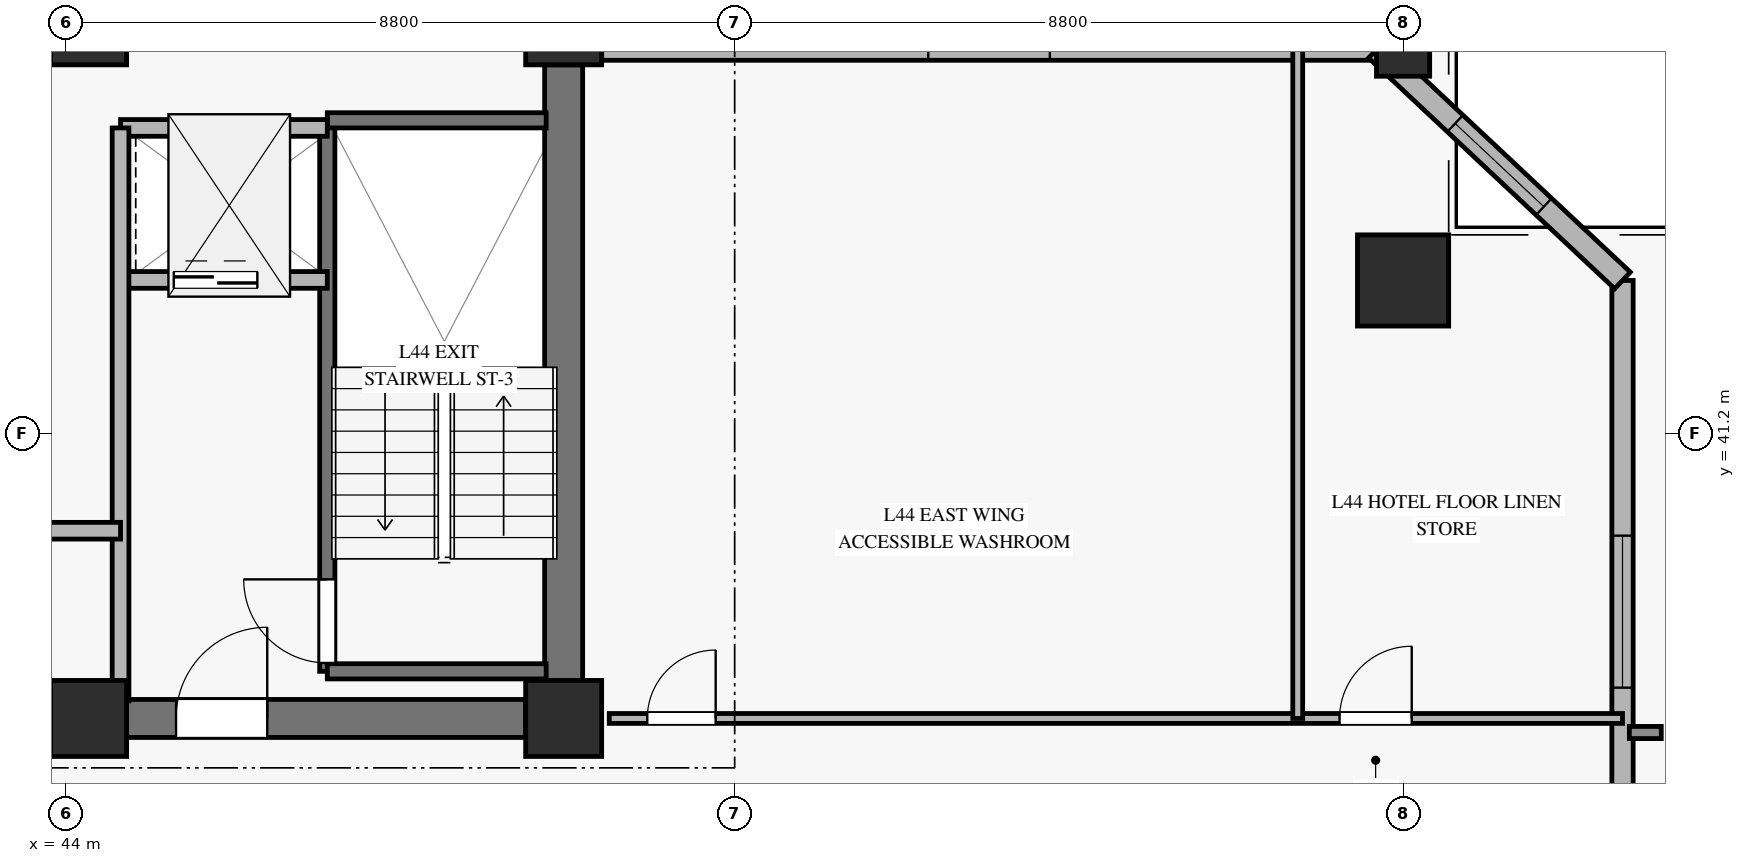
"""IFC4 building model, lengths in metres.
Left out: names, types, materials, properties, quantities, classifications, styles, units other than length and angle.
Written with IfcOpenShell. Run it as: python <this file> out.ifc"""

import sys

from ifc_helpers import new_model, si_unit, direction, frame, frame_2d, origin, origin_2d, place, context, subcontext, project, spatial, rectangle, hollow_rectangle, extrude, source, transform, mapped, element, fill, save


model = new_model("IFC4")
c1 = context("Model", 3, precision=1e-05, world=origin(), true_north=direction((0.0, 1.0)))
c2 = subcontext(c1, "Body", "Model", "MODEL_VIEW")
j1 = project(units=[si_unit("LENGTHUNIT", "METRE"), si_unit("PLANEANGLEUNIT", "RADIAN")], contexts=[c1])
p1 = place(None, origin())
s1 = spatial("IfcSite", under=j1, at=p1, CompositionType="ELEMENT")
p2 = place(p1, origin())
s2 = spatial("IfcBuilding", under=s1, at=p2, CompositionType="ELEMENT")
p3 = place(p2, frame((0.0, 0.0, 177.2)))
s3 = spatial("IfcBuildingStorey", under=s2, at=p3, CompositionType="ELEMENT", Elevation=177.2)
m1 = source(origin(), c2, "Body", "SweptSolid", [
    extrude(rectangle(XDim=1.0, YDim=1.0, at=origin_2d()), origin(), (0.0, 0.0, 1.0), 3.27),
])
for number, where, z_axis, x_axis in (
    (1, (44.3, 37.45, 0.0), (0.0, 0.0, 1.0), (1.0, 0.0, 0.0)),
    (2, (44.3, 46.55, 0.0), (0.0, 0.0, 1.0), (1.0, 0.0, 0.0)),
    (3, (50.55, 37.45, 0.0), (0.0, 0.0, 1.0), (1.0, 0.0, 0.0)),
    (4, (50.55, 46.55, 0.0), (0.0, 0.0, 1.0), (1.0, 0.0, 0.0)),
):
    element("IfcColumn", number, at=place(p3, frame(where, z_axis=z_axis, x_axis=x_axis)), inside=s3, PredefinedType="PILASTER", context=c2, shape_type="MappedRepresentation", body=[
        mapped(m1, transform((0.0, 0.0, 0.0), x_axis=(1.0, 0.0, 0.0), y_axis=(0.0, 1.0, 0.0), z_axis=(0.0, 0.0, 1.0), scale=1.0)),
    ])
p4 = place(p3, frame((44.8, 37.45, 0.0), z_axis=(0.0, 0.0, 1.0), x_axis=(1.0, 0.0, 0.0)))
e5 = element("IfcWall", 5, at=p4, inside=s3, PredefinedType="SHEAR", context=c2, shape_type="SweptSolid", body=[
    extrude(rectangle(XDim=5.25, YDim=0.5, at=frame_2d((2.625, 0.0))), origin(), (0.0, 0.0, 1.0), 3.27),
])
p5 = place(p4, frame((0.65, 0.0, 0.0)))
e6 = element("IfcOpeningElement", 6, at=p5, cuts=e5, PredefinedType="OPENING", context=c2, shape_type="SweptSolid", body=[
    extrude(rectangle(XDim=1.2, YDim=2.15, at=frame_2d((0.6, 1.075))), frame((0.0, 0.26, 0.0), z_axis=(0.0, -1.0, 0.0), x_axis=(1.0, 0.0, 0.0)), (0.0, 0.0, 1.0), 0.52),
])
p6 = place(p3, frame((50.55, 37.95, 0.0), z_axis=(0.0, 0.0, 1.0), x_axis=(0.0, 1.0, 0.0)))
e7 = element("IfcWall", 7, at=p6, inside=s3, PredefinedType="SHEAR", context=c2, shape_type="SweptSolid", body=[
    extrude(rectangle(XDim=8.1, YDim=0.5, at=frame_2d((4.05, 0.0))), origin(), (0.0, 0.0, 1.0), 3.27),
])
m2 = source(origin(), c2, "Body", "SweptSolid", [
    extrude(hollow_rectangle(XDim=1.2, YDim=1.2, WallThickness=0.055, at=origin_2d()), origin(), (0.0, 0.0, 1.0), 3.277),
])
p7 = place(p3, frame((61.594, 43.213, 0.0), z_axis=(-0.06348024984, 0.007972284898, 0.997951251592), x_axis=(-0.124608036267, -0.992206045788, 0.0)))
e8 = element("IfcColumn", 8, at=p7, inside=s3, PredefinedType="COLUMN", context=c2, shape_type="MappedRepresentation", body=[
    mapped(m2, transform((0.0, 0.0, 0.0), x_axis=(1.0, 0.0, 0.0), y_axis=(0.0, 1.0, 0.0), z_axis=(0.0, 0.0, 1.0), scale=1.0)),
])
m3 = source(origin(), c2, "Body", "SweptSolid", [
    extrude(hollow_rectangle(XDim=0.7, YDim=0.7, WallThickness=0.032, at=origin_2d()), origin(), (0.0, 0.0, 1.0), 3.277),
])
p8 = place(p3, frame((61.594, 46.25, 0.0), z_axis=(-0.063482267254, 0.0, 0.99798296666), x_axis=(0.0, -1.0, 0.0)))
e9 = element("IfcColumn", 9, at=p8, inside=s3, PredefinedType="COLUMN", context=c2, shape_type="MappedRepresentation", body=[
    mapped(m3, transform((0.0, 0.0, 0.0), x_axis=(1.0, 0.0, 0.0), y_axis=(0.0, 1.0, 0.0), z_axis=(0.0, 0.0, 1.0), scale=1.0)),
])
p9 = place(p3, frame((64.481, 28.213, 0.0), z_axis=(0.0, 0.0, 1.0), x_axis=(0.0, 1.0, 0.0)))
e10 = element("IfcWall", 10, at=p9, inside=s3, PredefinedType="SOLIDWALL", context=c2, shape_type="SweptSolid", body=[
    extrude(rectangle(XDim=15.0, YDim=0.28, at=frame_2d((7.5, 0.0))), origin(), (0.0, 0.0, 1.0), 2.75),
])
p10 = place(p9, frame((9.642, 0.0, 0.45)))
e11 = element("IfcOpeningElement", 11, at=p10, cuts=e10, PredefinedType="OPENING", context=c2, shape_type="SweptSolid", body=[
    extrude(rectangle(XDim=2.0, YDim=2.0, at=frame_2d((1.0, 1.0))), frame((0.0, 0.15, 0.0), z_axis=(0.0, -1.0, 0.0), x_axis=(1.0, 0.0, 0.0)), (0.0, 0.0, 1.0), 0.3),
])
p11 = place(p3, frame((51.05, 46.25, 0.0), z_axis=(0.0, 0.0, 1.0), x_axis=(1.0, 0.0, 0.0)))
e12 = element("IfcWall", 12, at=p11, inside=s3, PredefinedType="SOLIDWALL", context=c2, shape_type="SweptSolid", body=[
    extrude(rectangle(XDim=10.194, YDim=0.28, at=frame_2d((5.097, 0.0))), origin(), (0.0, 0.0, 1.0), 2.75),
])
p12 = place(p11, frame((4.297, 0.0, 0.45)))
e13 = element("IfcOpeningElement", 13, at=p12, cuts=e12, PredefinedType="OPENING", context=c2, shape_type="SweptSolid", body=[
    extrude(rectangle(XDim=1.6, YDim=2.0, at=frame_2d((0.8, 1.0))), frame((0.0, 0.15, 0.0), z_axis=(0.0, -1.0, 0.0), x_axis=(1.0, 0.0, 0.0)), (0.0, 0.0, 1.0), 0.3),
])
p13 = place(p3, frame((64.481, 43.213, 0.0), z_axis=(0.0, 0.0, 1.0), x_axis=(-0.729271287048, 0.684224663314, 0.0)))
e14 = element("IfcWall", 14, at=p13, inside=s3, PredefinedType="SOLIDWALL", context=c2, shape_type="SweptSolid", body=[
    extrude(rectangle(XDim=4.439, YDim=0.3, at=frame_2d((2.219, 0.0))), origin(), (0.0, 0.0, 1.0), 2.75),
])
p14 = place(p13, frame((1.419, 0.0, 0.45)))
e15 = element("IfcOpeningElement", 15, at=p14, cuts=e14, PredefinedType="OPENING", context=c2, shape_type="SweptSolid", body=[
    extrude(rectangle(XDim=1.6, YDim=2.0, at=frame_2d((0.8, 1.0))), frame((0.0, 0.16, 0.0), z_axis=(0.0, -1.0, 0.0), x_axis=(1.0, 0.0, 0.0)), (0.0, 0.0, 1.0), 0.32),
])
p15 = place(p3, frame((47.44, 38.07, 0.0), z_axis=(0.0, 0.0, 1.0), x_axis=(0.0, 1.0, 0.0)))
e16 = element("IfcWall", 16, at=p15, inside=s3, PredefinedType="SOLIDWALL", context=c2, shape_type="SweptSolid", body=[
    extrude(rectangle(XDim=7.25, YDim=0.2, at=frame_2d((3.625, 0.0))), origin(), (0.0, 0.0, 1.0), 3.5),
])
p16 = place(p15, frame((0.11, 0.0, 0.0)))
e17 = element("IfcOpeningElement", 17, at=p16, cuts=e16, PredefinedType="OPENING", context=c2, shape_type="SweptSolid", body=[
    extrude(rectangle(XDim=1.1, YDim=2.15, at=frame_2d((0.55, 1.075))), frame((0.0, 0.11, 0.0), z_axis=(0.0, -1.0, 0.0), x_axis=(1.0, 0.0, 0.0)), (0.0, 0.0, 1.0), 0.22),
])
for number, where, z_axis, x_axis in (
    (18, (47.44, 45.32, 0.0), (0.0, 0.0, 1.0), (1.0, 0.0, 0.0)),
    (19, (47.44, 38.07, 0.0), (0.0, 0.0, 1.0), (1.0, 0.0, 0.0)),
):
    element("IfcWall", number, at=place(p3, frame(where, z_axis=z_axis, x_axis=x_axis)), inside=s3, PredefinedType="SOLIDWALL", context=c2, shape_type="SweptSolid", body=[
        extrude(rectangle(XDim=2.88, YDim=0.2, at=frame_2d((1.44, 0.0))), origin(), (0.0, 0.0, 1.0), 3.5),
    ])
p17 = place(p3, frame((44.72, 43.22, 0.0), z_axis=(0.0, 0.0, 1.0), x_axis=(1.0, 0.0, 0.0)))
e20 = element("IfcWall", 20, at=p17, inside=s3, PredefinedType="SOLIDWALL", context=c2, shape_type="SweptSolid", body=[
    extrude(rectangle(XDim=2.72, YDim=0.22, at=frame_2d((1.36, 0.0))), origin(), (0.0, 0.0, 1.0), 3.27),
])
p18 = place(p17, frame((0.7, 0.0, 0.0)))
e21 = element("IfcOpeningElement", 21, at=p18, cuts=e20, PredefinedType="OPENING", context=c2, shape_type="SweptSolid", body=[
    extrude(rectangle(XDim=1.1, YDim=2.2, at=frame_2d((0.55, 1.1))), frame((0.0, 0.12, 0.0), z_axis=(0.0, -1.0, 0.0), x_axis=(1.0, 0.0, 0.0)), (0.0, 0.0, 1.0), 0.24),
])
p19 = place(p3, frame((44.72, 45.22, 0.0), z_axis=(0.0, 0.0, 1.0), x_axis=(1.0, 0.0, 0.0)))
e22 = element("IfcWall", 22, at=p19, inside=s3, PredefinedType="SOLIDWALL", context=c2, shape_type="SweptSolid", body=[
    extrude(rectangle(XDim=2.72, YDim=0.22, at=frame_2d((1.36, 0.0))), origin(), (0.0, 0.0, 1.0), 3.27),
])
p20 = place(p3, frame((44.72, 37.68, 0.0), z_axis=(0.0, 0.0, 1.0), x_axis=(0.0, 1.0, 0.0)))
e23 = element("IfcWall", 23, at=p20, inside=s3, PredefinedType="SOLIDWALL", context=c2, shape_type="SweptSolid", body=[
    extrude(rectangle(XDim=7.54, YDim=0.22, at=frame_2d((3.77, 0.0))), origin(), (0.0, 0.0, 1.0), 3.27),
])
p21 = place(p3, frame((36.12, 39.92, 0.0), z_axis=(0.0, 0.0, 1.0), x_axis=(1.0, 0.0, 0.0)))
e24 = element("IfcWall", 24, at=p21, inside=s3, PredefinedType="SOLIDWALL", context=c2, shape_type="SweptSolid", body=[
    extrude(rectangle(XDim=8.6, YDim=0.22, at=frame_2d((4.3, 0.0))), origin(), (0.0, 0.0, 1.0), 2.555),
])
p22 = place(p3, frame((51.15, 37.45, 0.0), z_axis=(0.0, 0.0, 1.0), x_axis=(1.0, 0.0, 0.0)))
e25 = element("IfcWall", 25, at=p22, inside=s3, PredefinedType="PARTITIONING", context=c2, shape_type="SweptSolid", body=[
    extrude(rectangle(XDim=13.331, YDim=0.13, at=frame_2d((6.666, 0.0))), origin(), (0.0, 0.0, 1.0), 2.755),
])
p23 = place(p22, frame((0.5, 0.0, 0.0)))
e26 = element("IfcOpeningElement", 26, at=p23, cuts=e25, PredefinedType="OPENING", context=c2, shape_type="SweptSolid", body=[
    extrude(rectangle(XDim=0.9, YDim=2.1, at=frame_2d((0.45, 1.05))), frame((0.0, 0.075, 0.0), z_axis=(0.0, -1.0, 0.0), x_axis=(1.0, 0.0, 0.0)), (0.0, 0.0, 1.0), 0.15),
])
p24 = place(p22, frame((9.608, 0.0, 0.0)))
e27 = element("IfcOpeningElement", 27, at=p24, cuts=e25, PredefinedType="OPENING", context=c2, shape_type="SweptSolid", body=[
    extrude(rectangle(XDim=0.95, YDim=2.1, at=frame_2d((0.475, 1.05))), frame((0.0, 0.075, 0.0), z_axis=(0.0, -1.0, 0.0), x_axis=(1.0, 0.0, 0.0)), (0.0, 0.0, 1.0), 0.15),
])
p25 = place(p3, frame((60.208, 37.45, 0.0), z_axis=(0.0, 0.0, 1.0), x_axis=(0.0, 1.0, 0.0)))
e28 = element("IfcWall", 28, at=p25, inside=s3, PredefinedType="PARTITIONING", context=c2, shape_type="SweptSolid", body=[
    extrude(rectangle(XDim=8.8, YDim=0.13, at=frame_2d((4.4, 0.0))), origin(), (0.0, 0.0, 1.0), 3.27),
])
m4 = source(origin(), c2, "Body", "SweptSolid", [
    extrude(rectangle(XDim=2.0, YDim=2.0, at=frame_2d((1.0, 1.0))), frame((0.0, 0.03, 0.0), z_axis=(0.0, -1.0, 0.0), x_axis=(1.0, 0.0, 0.0)), (0.0, 0.0, 1.0), 0.06),
])
p26 = place(p10, origin())
e29 = element("IfcWindow", 29, at=p26, inside=s3, PartitioningType="SINGLE_PANEL", PredefinedType="WINDOW", context=c2, shape_type="MappedRepresentation", body=[
    mapped(m4, transform((0.0, 0.0, 0.0), x_axis=(1.0, 0.0, 0.0), y_axis=(0.0, 1.0, 0.0), z_axis=(0.0, 0.0, 1.0), scale=1.0)),
])
fill(e11, e29)
m5 = source(origin(), c2, "Body", "SweptSolid", [
    extrude(rectangle(XDim=1.6, YDim=2.0, at=frame_2d((0.8, 1.0))), frame((0.0, 0.03, 0.0), z_axis=(0.0, -1.0, 0.0), x_axis=(1.0, 0.0, 0.0)), (0.0, 0.0, 1.0), 0.06),
])
p27 = place(p14, origin())
e30 = element("IfcWindow", 30, at=p27, inside=s3, PartitioningType="SINGLE_PANEL", PredefinedType="WINDOW", context=c2, shape_type="MappedRepresentation", body=[
    mapped(m5, transform((0.0, 0.0, 0.0), x_axis=(1.0, 0.0, 0.0), y_axis=(0.0, 1.0, 0.0), z_axis=(0.0, 0.0, 1.0), scale=1.0)),
])
fill(e15, e30)
m6 = source(origin(), c2, "Body", "SweptSolid", [
    extrude(rectangle(XDim=1.1, YDim=2.15, at=frame_2d((0.55, 1.075))), frame((0.0, 0.025, 0.0), z_axis=(0.0, -1.0, 0.0), x_axis=(1.0, 0.0, 0.0)), (0.0, 0.0, 1.0), 0.05),
])
p28 = place(p16, origin())
e31 = element("IfcDoor", 31, at=p28, inside=s3, OperationType="SINGLE_SWING_RIGHT", PredefinedType="DOOR", context=c2, shape_type="MappedRepresentation", body=[
    mapped(m6, transform((0.0, 0.0, 0.0), x_axis=(1.0, 0.0, 0.0), y_axis=(0.0, 1.0, 0.0), z_axis=(0.0, 0.0, 1.0), scale=1.0)),
])
fill(e17, e31)
m7 = source(origin(), c2, "Body", "SweptSolid", [
    extrude(rectangle(XDim=1.1, YDim=2.2, at=frame_2d((0.55, 1.1))), frame((0.0, 0.025, 0.0), z_axis=(0.0, -1.0, 0.0), x_axis=(1.0, 0.0, 0.0)), (0.0, 0.0, 1.0), 0.05),
])
p29 = place(p18, origin())
e32 = element("IfcDoor", 32, at=p29, inside=s3, OperationType="SLIDING_TO_LEFT", PredefinedType="DOOR", context=c2, shape_type="MappedRepresentation", body=[
    mapped(m7, transform((0.0, 0.0, 0.0), x_axis=(1.0, 0.0, 0.0), y_axis=(0.0, 1.0, 0.0), z_axis=(0.0, 0.0, 1.0), scale=1.0)),
])
fill(e21, e32)
m8 = source(origin(), c2, "Body", "SweptSolid", [
    extrude(rectangle(XDim=1.2, YDim=2.15, at=frame_2d((0.6, 1.075))), frame((0.0, 0.025, 0.0), z_axis=(0.0, -1.0, 0.0), x_axis=(1.0, 0.0, 0.0)), (0.0, 0.0, 1.0), 0.05),
])
p30 = place(p5, origin())
e33 = element("IfcDoor", 33, at=p30, inside=s3, OperationType="SINGLE_SWING_RIGHT", PredefinedType="DOOR", context=c2, shape_type="MappedRepresentation", body=[
    mapped(m8, transform((0.0, 0.0, 0.0), x_axis=(1.0, 0.0, 0.0), y_axis=(0.0, 1.0, 0.0), z_axis=(0.0, 0.0, 1.0), scale=1.0)),
])
fill(e6, e33)
m9 = source(origin(), c2, "Body", "SweptSolid", [
    extrude(rectangle(XDim=0.9, YDim=2.1, at=frame_2d((0.45, 1.05))), frame((0.0, 0.025, 0.0), z_axis=(0.0, -1.0, 0.0), x_axis=(1.0, 0.0, 0.0)), (0.0, 0.0, 1.0), 0.05),
])
p31 = place(p23, origin())
e34 = element("IfcDoor", 34, at=p31, inside=s3, OperationType="SINGLE_SWING_RIGHT", PredefinedType="DOOR", context=c2, shape_type="MappedRepresentation", body=[
    mapped(m9, transform((0.0, 0.0, 0.0), x_axis=(1.0, 0.0, 0.0), y_axis=(0.0, 1.0, 0.0), z_axis=(0.0, 0.0, 1.0), scale=1.0)),
])
fill(e26, e34)
m10 = source(origin(), c2, "Body", "SweptSolid", [
    extrude(rectangle(XDim=0.95, YDim=2.1, at=frame_2d((0.475, 1.05))), frame((0.0, 0.025, 0.0), z_axis=(0.0, -1.0, 0.0), x_axis=(1.0, 0.0, 0.0)), (0.0, 0.0, 1.0), 0.05),
])
p32 = place(p24, origin())
e35 = element("IfcDoor", 35, at=p32, inside=s3, OperationType="SINGLE_SWING_RIGHT", PredefinedType="DOOR", context=c2, shape_type="MappedRepresentation", body=[
    mapped(m10, transform((0.0, 0.0, 0.0), x_axis=(1.0, 0.0, 0.0), y_axis=(0.0, 1.0, 0.0), z_axis=(0.0, 0.0, 1.0), scale=1.0)),
])
fill(e27, e35)
save(model, sys.argv[1])
